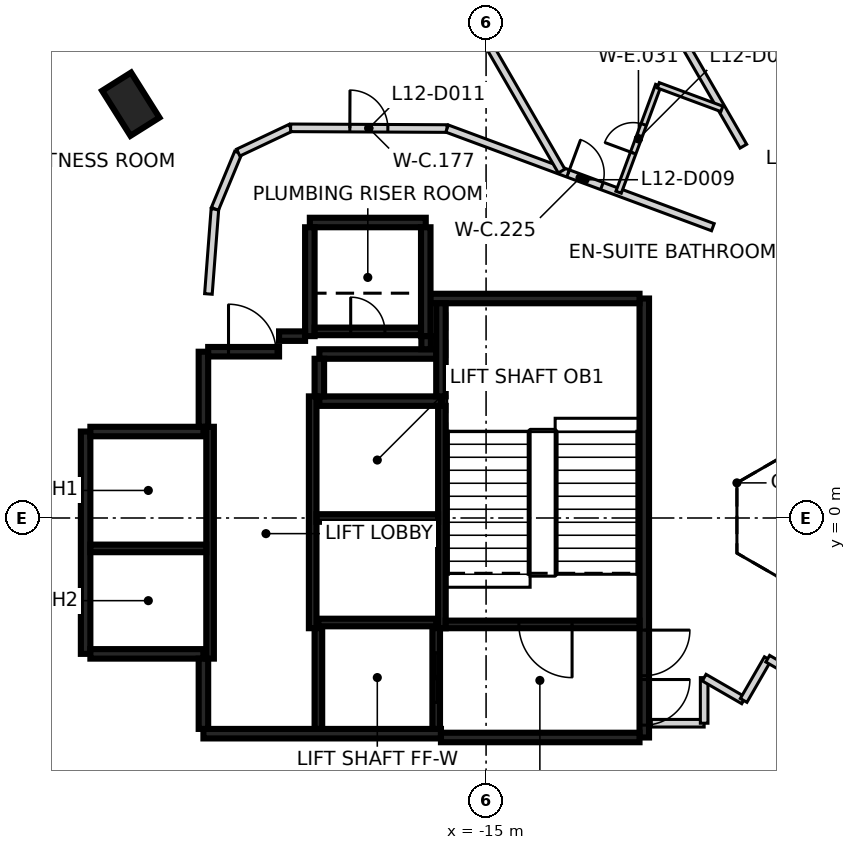
"""IFC4 building model, lengths in metres.
Left out: names, types, materials, properties, quantities, classifications, styles, units other than length and angle.
Written with IfcOpenShell. Run it as: python <this file> out.ifc"""

import sys

from ifc_helpers import new_model, si_unit, direction, frame, frame_2d, origin, origin_2d, place, context, subcontext, project, spatial, rectangle, extrude, element, fill, save


model = new_model("IFC4")
c1 = context("Model", 3, precision=1e-05, world=origin(), true_north=direction((0.0, 1.0)))
c2 = subcontext(c1, "Body", "Model", "MODEL_VIEW")
j1 = project(units=[si_unit("LENGTHUNIT", "METRE"), si_unit("PLANEANGLEUNIT", "RADIAN")], contexts=[c1])
p1 = place(None, origin())
s1 = spatial("IfcSite", under=j1, at=p1, CompositionType="ELEMENT")
p2 = place(p1, origin())
s2 = spatial("IfcBuilding", under=s1, at=p2, CompositionType="ELEMENT")
p3 = place(p2, frame((0.0, 0.0, 56.6)))
s3 = spatial("IfcBuildingStorey", under=s2, at=p3, CompositionType="ELEMENT", Elevation=56.6)
p4 = place(p3, frame((-24.349, 10.888, -0.475), z_axis=(0.0, 0.0, 1.0), x_axis=(-0.532388815436, 0.84649994046, 0.0)))
e1 = element("IfcColumn", 1, at=p4, inside=s3, PredefinedType="COLUMN", context=c2, shape_type="SweptSolid", body=[
    extrude(rectangle(XDim=1.4, YDim=0.9, at=origin_2d()), origin(), (0.0, 0.0, 1.0), 3.6),
])
p5 = place(p3, frame((-10.837, 5.775, 0.0), z_axis=(0.0, 0.0, 1.0), x_axis=(0.0, -1.0, 0.0)))
e2 = element("IfcWall", 2, at=p5, inside=s3, PredefinedType="SHEAR", context=c2, shape_type="SweptSolid", body=[
    extrude(rectangle(XDim=11.55, YDim=0.25, at=frame_2d((5.775, 0.0))), origin(), (0.0, 0.0, 1.0), 3.125),
])
p6 = place(p5, frame((10.025, 0.0, 0.0)))
e3 = element("IfcOpeningElement", 3, at=p6, cuts=e2, PredefinedType="OPENING", context=c2, shape_type="SweptSolid", body=[
    extrude(rectangle(XDim=1.2, YDim=2.1, at=frame_2d((0.6, 1.05))), frame((0.0, 0.135, 0.0), z_axis=(0.0, -1.0, 0.0), x_axis=(1.0, 0.0, 0.0)), (0.0, 0.0, 1.0), 0.27),
])
p7 = place(p5, frame((8.725, 0.0, 0.0)))
e4 = element("IfcOpeningElement", 4, at=p7, cuts=e2, PredefinedType="OPENING", context=c2, shape_type="SweptSolid", body=[
    extrude(rectangle(XDim=1.2, YDim=2.1, at=frame_2d((0.6, 1.05))), frame((0.0, 0.135, 0.0), z_axis=(0.0, -1.0, 0.0), x_axis=(1.0, 0.0, 0.0)), (0.0, 0.0, 1.0), 0.27),
])
p8 = place(p3, frame((-16.187, -5.675, 0.0), z_axis=(0.0, 0.0, 1.0), x_axis=(-1.0, 0.0, 0.0)))
e5 = element("IfcWall", 5, at=p8, inside=s3, PredefinedType="SHEAR", context=c2, shape_type="SweptSolid", body=[
    extrude(rectangle(XDim=6.25, YDim=0.25, at=frame_2d((3.125, 0.0))), origin(), (0.0, 0.0, 1.0), 3.125),
])
p9 = place(p3, frame((-25.537, -3.575, 0.0), z_axis=(0.0, 0.0, 1.0), x_axis=(0.0, 1.0, 0.0)))
e6 = element("IfcWall", 6, at=p9, inside=s3, PredefinedType="SHEAR", context=c2, shape_type="SweptSolid", body=[
    extrude(rectangle(XDim=5.85, YDim=0.25, at=frame_2d((2.925, 0.0))), origin(), (0.0, 0.0, 1.0), 3.125),
])
p10 = place(p3, frame((-10.963, -5.775, 0.0), z_axis=(0.0, 0.0, 1.0), x_axis=(-1.0, 0.0, 0.0)))
e7 = element("IfcWall", 7, at=p10, inside=s3, PredefinedType="SHEAR", context=c2, shape_type="SweptSolid", body=[
    extrude(rectangle(XDim=5.225, YDim=0.25, at=frame_2d((2.612, 0.0))), origin(), (0.0, 0.0, 1.0), 3.125),
])
p11 = place(p3, frame((-16.472, 5.775, 0.0), z_axis=(0.0, 0.0, 1.0), x_axis=(1.0, 0.0, 0.0)))
e8 = element("IfcWall", 8, at=p11, inside=s3, PredefinedType="SHEAR", context=c2, shape_type="SweptSolid", body=[
    extrude(rectangle(XDim=5.51, YDim=0.25, at=frame_2d((2.755, 0.0))), origin(), (0.0, 0.0, 1.0), 3.125),
])
p12 = place(p3, frame((-19.387, 3.075, 0.0), z_axis=(0.0, 0.0, 1.0), x_axis=(1.0, 0.0, 0.0)))
e9 = element("IfcWall", 9, at=p12, inside=s3, PredefinedType="SHEAR", context=c2, shape_type="SweptSolid", body=[
    extrude(rectangle(XDim=3.2, YDim=0.25, at=frame_2d((1.6, 0.0))), origin(), (0.0, 0.0, 1.0), 3.125),
])
for number, where, z_axis, x_axis in (
    (10, (-22.437, -3.575, 0.0), (0.0, 0.0, 1.0), (-1.0, 0.0, 0.0)),
    (11, (-25.412, 2.275, 0.0), (0.0, 0.0, 1.0), (1.0, 0.0, 0.0)),
):
    element("IfcWall", number, at=place(p3, frame(where, z_axis=z_axis, x_axis=x_axis)), inside=s3, PredefinedType="SHEAR", context=c2, shape_type="SweptSolid", body=[
        extrude(rectangle(XDim=2.975, YDim=0.25, at=frame_2d((1.487, 0.0))), origin(), (0.0, 0.0, 1.0), 3.125),
    ])
p13 = place(p3, frame((-19.637, 7.775, 0.0), z_axis=(0.0, 0.0, 1.0), x_axis=(1.0, 0.0, 0.0)))
e12 = element("IfcWall", 12, at=p13, inside=s3, PredefinedType="SHEAR", context=c2, shape_type="SweptSolid", body=[
    extrude(rectangle(XDim=3.05, YDim=0.25, at=frame_2d((1.525, 0.0))), origin(), (0.0, 0.0, 1.0), 3.125),
])
for number, where, z_axis, x_axis in (
    (13, (-16.587, 7.65, 0.0), (0.0, 0.0, 1.0), (0.0, -1.0, 0.0)),
    (14, (-19.637, 4.785, 0.0), (0.0, 0.0, 1.0), (0.0, 1.0, 0.0)),
):
    element("IfcWall", number, at=place(p3, frame(where, z_axis=z_axis, x_axis=x_axis)), inside=s3, PredefinedType="SHEAR", context=c2, shape_type="SweptSolid", body=[
        extrude(rectangle(XDim=2.865, YDim=0.25, at=frame_2d((1.432, 0.0))), origin(), (0.0, 0.0, 1.0), 3.125),
    ])
p14 = place(p3, frame((-16.302, 4.315, 0.0), z_axis=(0.0, 0.0, 1.0), x_axis=(-1.0, 0.0, 0.0)))
e15 = element("IfcWall", 15, at=p14, inside=s3, PredefinedType="SHEAR", context=c2, shape_type="SweptSolid", body=[
    extrude(rectangle(XDim=3.085, YDim=0.25, at=frame_2d((1.542, 0.0))), origin(), (0.0, 0.0, 1.0), 3.125),
])
p15 = place(p3, frame((-16.187, 3.2, 0.0), z_axis=(0.0, 0.0, 1.0), x_axis=(0.0, 1.0, 0.0)))
e16 = element("IfcWall", 16, at=p15, inside=s3, PredefinedType="SHEAR", context=c2, shape_type="SweptSolid", body=[
    extrude(rectangle(XDim=2.449, YDim=0.25, at=frame_2d((1.225, 0.0))), origin(), (0.0, 0.0, 1.0), 3.125),
])
p16 = place(p3, frame((-22.437, 2.4, 0.0), z_axis=(0.0, 0.0, 1.0), x_axis=(0.0, 1.0, 0.0)))
e17 = element("IfcWall", 17, at=p16, inside=s3, PredefinedType="SHEAR", context=c2, shape_type="SweptSolid", body=[
    extrude(rectangle(XDim=1.975, YDim=0.25, at=frame_2d((0.987, 0.0))), origin(), (0.0, 0.0, 1.0), 3.125),
])
p17 = place(p3, frame((-22.437, -5.55, 0.0), z_axis=(0.0, 0.0, 1.0), x_axis=(0.0, 1.0, 0.0)))
e18 = element("IfcWall", 18, at=p17, inside=s3, PredefinedType="SHEAR", context=c2, shape_type="SweptSolid", body=[
    extrude(rectangle(XDim=1.849, YDim=0.25, at=frame_2d((0.925, 0.0))), origin(), (0.0, 0.0, 1.0), 3.125),
])
p18 = place(p3, frame((-22.312, 4.375, 0.0), z_axis=(0.0, 0.0, 1.0), x_axis=(1.0, 0.0, 0.0)))
e19 = element("IfcWall", 19, at=p18, inside=s3, PredefinedType="SHEAR", context=c2, shape_type="SweptSolid", body=[
    extrude(rectangle(XDim=1.865, YDim=0.25, at=frame_2d((0.932, 0.0))), origin(), (0.0, 0.0, 1.0), 3.125),
])
p19 = place(p18, frame((0.535, 0.0, 0.0)))
e20 = element("IfcOpeningElement", 20, at=p19, cuts=e19, PredefinedType="OPENING", context=c2, shape_type="SweptSolid", body=[
    extrude(rectangle(XDim=1.25, YDim=2.1, at=frame_2d((0.625, 1.05))), frame((0.0, 0.135, 0.0), z_axis=(0.0, -1.0, 0.0), x_axis=(1.0, 0.0, 0.0)), (0.0, 0.0, 1.0), 0.27),
])
p20 = place(p3, frame((-19.387, 4.19, 0.0), z_axis=(0.0, 0.0, 1.0), x_axis=(0.0, -1.0, 0.0)))
e21 = element("IfcWall", 21, at=p20, inside=s3, PredefinedType="SHEAR", context=c2, shape_type="SweptSolid", body=[
    extrude(rectangle(XDim=0.989, YDim=0.25, at=frame_2d((0.495, 0.0))), origin(), (0.0, 0.0, 1.0), 3.125),
])
p21 = place(p3, frame((-20.447, 4.785, 0.0), z_axis=(0.0, 0.0, 1.0), x_axis=(1.0, 0.0, 0.0)))
e22 = element("IfcWall", 22, at=p21, inside=s3, PredefinedType="SHEAR", context=c2, shape_type="SweptSolid", body=[
    extrude(rectangle(XDim=0.685, YDim=0.25, at=frame_2d((0.342, 0.0))), origin(), (0.0, 0.0, 1.0), 3.125),
])
p22 = place(p3, frame((-16.577, 4.785, 0.0), z_axis=(0.0, 0.0, 1.0), x_axis=(0.0, -1.0, 0.0)))
e23 = element("IfcWall", 23, at=p22, inside=s3, PredefinedType="SHEAR", context=c2, shape_type="SweptSolid", body=[
    extrude(rectangle(XDim=0.344, YDim=0.25, at=frame_2d((0.172, 0.0))), origin(), (0.0, 0.0, 1.0), 3.125),
])
p23 = place(p3, frame((-16.162, 2.951, 0.0), z_axis=(0.0, 0.0, 1.0), x_axis=(0.0, -1.0, 0.0)))
e24 = element("IfcWall", 24, at=p23, inside=s3, PredefinedType="SHEAR", context=c2, shape_type="SweptSolid", body=[
    extrude(rectangle(XDim=5.851, YDim=0.2, at=frame_2d((2.925, 0.0))), origin(), (0.0, 0.0, 1.0), 3.125),
])
for number, where, z_axis, x_axis in (
    (25, (-19.562, -2.9, 0.0), (0.0, 0.0, 1.0), (0.0, 1.0, 0.0)),
    (26, (-22.262, 2.4, 0.0), (0.0, 0.0, 1.0), (0.0, -1.0, 0.0)),
):
    element("IfcWall", number, at=place(p3, frame(where, z_axis=z_axis, x_axis=x_axis)), inside=s3, PredefinedType="SHEAR", context=c2, shape_type="SweptSolid", body=[
        extrude(rectangle(XDim=6.1, YDim=0.2, at=frame_2d((3.05, 0.0))), origin(), (0.0, 0.0, 1.0), 3.125),
    ])
p24 = place(p3, frame((-10.963, -2.8, 0.0), z_axis=(0.0, 0.0, 1.0), x_axis=(-1.0, 0.0, 0.0)))
e27 = element("IfcWall", 27, at=p24, inside=s3, PredefinedType="SHEAR", context=c2, shape_type="SweptSolid", body=[
    extrude(rectangle(XDim=5.098, YDim=0.2, at=frame_2d((2.549, 0.0))), origin(), (0.0, 0.0, 1.0), 3.125),
])
p25 = place(p24, frame((1.774, 0.0, 0.0)))
e28 = element("IfcOpeningElement", 28, at=p25, cuts=e27, PredefinedType="OPENING", context=c2, shape_type="SweptSolid", body=[
    extrude(rectangle(XDim=1.4, YDim=2.1, at=frame_2d((0.7, 1.05))), frame((0.0, 0.11, 0.0), z_axis=(0.0, -1.0, 0.0), x_axis=(1.0, 0.0, 0.0)), (0.0, 0.0, 1.0), 0.22),
])
p26 = place(p3, frame((-16.263, 0.0, 0.0), z_axis=(0.0, 0.0, 1.0), x_axis=(-1.0, 0.0, 0.0)))
e29 = element("IfcWall", 29, at=p26, inside=s3, PredefinedType="SHEAR", context=c2, shape_type="SweptSolid", body=[
    extrude(rectangle(XDim=3.198, YDim=0.2, at=frame_2d((1.599, 0.0))), origin(), (0.0, 0.0, 1.0), 3.125),
])
p27 = place(p3, frame((-22.363, -0.8, 0.0), z_axis=(0.0, 0.0, 1.0), x_axis=(-1.0, 0.0, 0.0)))
e30 = element("IfcWall", 30, at=p27, inside=s3, PredefinedType="SHEAR", context=c2, shape_type="SweptSolid", body=[
    extrude(rectangle(XDim=3.048, YDim=0.2, at=frame_2d((1.524, 0.0))), origin(), (0.0, 0.0, 1.0), 3.125),
])
p28 = place(p3, frame((-19.511, 4.91, 0.0), z_axis=(0.0, 0.0, 1.0), x_axis=(1.0, 0.0, 0.0)))
e31 = element("IfcWall", 31, at=p28, inside=s3, PredefinedType="SHEAR", context=c2, shape_type="SweptSolid", body=[
    extrude(rectangle(XDim=2.798, YDim=0.2, at=frame_2d((1.399, 0.0))), origin(), (0.0, 0.0, 1.0), 3.125),
])
p29 = place(p28, frame((0.949, 0.0, 0.0)))
e32 = element("IfcOpeningElement", 32, at=p29, cuts=e31, PredefinedType="OPENING", context=c2, shape_type="SweptSolid", body=[
    extrude(rectangle(XDim=0.9, YDim=2.1, at=frame_2d((0.45, 1.05))), frame((0.0, 0.11, 0.0), z_axis=(0.0, -1.0, 0.0), x_axis=(1.0, 0.0, 0.0)), (0.0, 0.0, 1.0), 0.22),
])
p30 = place(p3, frame((-19.412, -2.75, 0.0), z_axis=(0.0, 0.0, 1.0), x_axis=(1.0, 0.0, 0.0)))
e33 = element("IfcWall", 33, at=p30, inside=s3, PredefinedType="SHEAR", context=c2, shape_type="SweptSolid", body=[
    extrude(rectangle(XDim=3.1, YDim=0.2, at=frame_2d((1.55, 0.0))), origin(), (0.0, 0.0, 1.0), 3.125),
])
p31 = place(p3, frame((-16.312, -2.898, 0.0), z_axis=(0.0, 0.0, 1.0), x_axis=(0.0, -1.0, 0.0)))
e34 = element("IfcWall", 34, at=p31, inside=s3, PredefinedType="SHEAR", context=c2, shape_type="SweptSolid", body=[
    extrude(rectangle(XDim=2.651, YDim=0.2, at=frame_2d((1.325, 0.0))), origin(), (0.0, 0.0, 1.0), 3.125),
])
p32 = place(p31, frame((0.652, 0.0, 0.0)))
e35 = element("IfcOpeningElement", 35, at=p32, cuts=e34, PredefinedType="OPENING", context=c2, shape_type="SweptSolid", body=[
    extrude(rectangle(XDim=1.3, YDim=2.1, at=frame_2d((0.65, 1.05))), frame((0.0, 0.11, 0.0), z_axis=(0.0, -1.0, 0.0), x_axis=(1.0, 0.0, 0.0)), (0.0, 0.0, 1.0), 0.22),
])
p33 = place(p3, frame((-19.412, -5.549, 0.0), z_axis=(0.0, 0.0, 1.0), x_axis=(0.0, 1.0, 0.0)))
e36 = element("IfcWall", 36, at=p33, inside=s3, PredefinedType="SHEAR", context=c2, shape_type="SweptSolid", body=[
    extrude(rectangle(XDim=2.651, YDim=0.2, at=frame_2d((1.325, 0.0))), origin(), (0.0, 0.0, 1.0), 3.125),
])
p34 = place(p3, frame((-22.306, 5.895, 0.0), z_axis=(0.0, 0.0, 1.0), x_axis=(0.076246699626, 0.997088983389, 0.0)))
e37 = element("IfcWall", 37, at=p34, inside=s3, PredefinedType="PARTITIONING", context=c2, shape_type="SweptSolid", body=[
    extrude(rectangle(XDim=2.241, YDim=0.2, at=frame_2d((1.121, 0.0))), origin(), (0.0, 0.0, 1.0), 3.125),
])
p35 = place(p3, frame((-22.135, 8.134, 0.0), z_axis=(0.0, 0.0, 1.0), x_axis=(0.383208453534, 0.923661886807, 0.0)))
e38 = element("IfcWall", 38, at=p35, inside=s3, PredefinedType="PARTITIONING", context=c2, shape_type="SweptSolid", body=[
    extrude(rectangle(XDim=1.602, YDim=0.2, at=frame_2d((0.801, 0.0))), origin(), (0.0, 0.0, 1.0), 3.125),
])
p36 = place(p3, frame((-21.521, 9.614, 0.0), z_axis=(0.0, 0.0, 1.0), x_axis=(0.904083527367, 0.427355795028, 0.0)))
e39 = element("IfcWall", 39, at=p36, inside=s3, PredefinedType="PARTITIONING", context=c2, shape_type="SweptSolid", body=[
    extrude(rectangle(XDim=1.523, YDim=0.2, at=frame_2d((0.761, 0.0))), origin(), (0.0, 0.0, 1.0), 3.125),
])
p37 = place(p3, frame((-20.143, 10.266, 0.0), z_axis=(0.0, 0.0, 1.0), x_axis=(0.999989297417, -0.004626559416, 0.0)))
e40 = element("IfcWall", 40, at=p37, inside=s3, PredefinedType="PARTITIONING", context=c2, shape_type="SweptSolid", body=[
    extrude(rectangle(XDim=4.116, YDim=0.2, at=frame_2d((2.058, 0.0))), origin(), (0.0, 0.0, 1.0), 3.125),
])
p38 = place(p37, frame((1.558, 0.0, 0.0)))
e41 = element("IfcOpeningElement", 41, at=p38, cuts=e40, PredefinedType="OPENING", context=c2, shape_type="SweptSolid", body=[
    extrude(rectangle(XDim=1.0, YDim=2.1, at=frame_2d((0.5, 1.05))), frame((0.0, 0.11, 0.0), z_axis=(0.0, -1.0, 0.0), x_axis=(1.0, 0.0, 0.0)), (0.0, 0.0, 1.0), 0.22),
])
p39 = place(p3, frame((-16.026, 10.247, 0.0), z_axis=(0.0, 0.0, 1.0), x_axis=(0.937540909117, -0.347875040397, 0.0)))
e42 = element("IfcWall", 42, at=p39, inside=s3, PredefinedType="PARTITIONING", context=c2, shape_type="SweptSolid", body=[
    extrude(rectangle(XDim=7.459, YDim=0.2, at=frame_2d((3.729, 0.0))), origin(), (0.0, 0.0, 1.0), 3.125),
])
p40 = place(p39, frame((3.396, 0.0, 0.0)))
e43 = element("IfcOpeningElement", 43, at=p40, cuts=e42, PredefinedType="OPENING", context=c2, shape_type="SweptSolid", body=[
    extrude(rectangle(XDim=0.95, YDim=2.1, at=frame_2d((0.475, 1.05))), frame((0.0, 0.11, 0.0), z_axis=(0.0, -1.0, 0.0), x_axis=(1.0, 0.0, 0.0)), (0.0, 0.0, 1.0), 0.22),
])
p41 = place(p3, frame((-10.652, -5.4, 0.0), z_axis=(0.0, 0.0, 1.0), x_axis=(1.0, 0.0, 0.0)))
e44 = element("IfcWall", 44, at=p41, inside=s3, PredefinedType="PARTITIONING", context=c2, shape_type="SweptSolid", body=[
    extrude(rectangle(XDim=1.39, YDim=0.2, at=frame_2d((0.695, 0.0))), origin(), (0.0, 0.0, 1.0), 3.125),
])
for number, where, z_axis, x_axis in (
    (45, (-9.262, -5.4, 0.0), (0.0, 0.0, 1.0), (0.0, 1.0, 0.0)),
    (46, (-9.262, -4.2, 0.0), (0.0, 0.0, 1.0), (0.866, -0.5, 0.0)),
):
    element("IfcWall", number, at=place(p3, frame(where, z_axis=z_axis, x_axis=x_axis)), inside=s3, PredefinedType="PARTITIONING", context=c2, shape_type="SweptSolid", body=[
        extrude(rectangle(XDim=1.2, YDim=0.2, at=frame_2d((0.6, 0.0))), origin(), (0.0, 0.0, 1.0), 3.125),
    ])
p42 = place(p3, frame((-8.223, -4.8, 0.0), z_axis=(0.0, 0.0, 1.0), x_axis=(0.499866914522, 0.866102227088, 0.0)))
e47 = element("IfcWall", 47, at=p42, inside=s3, PredefinedType="PARTITIONING", context=c2, shape_type="SweptSolid", body=[
    extrude(rectangle(XDim=1.268, YDim=0.2, at=frame_2d((0.634, 0.0))), origin(), (0.0, 0.0, 1.0), 3.125),
])
p43 = place(p3, frame((-7.589, -3.702, 0.0), z_axis=(0.0, 0.0, 1.0), x_axis=(0.865995139556, -0.500052415518, 0.0)))
e48 = element("IfcWall", 48, at=p43, inside=s3, PredefinedType="PARTITIONING", context=c2, shape_type="SweptSolid", body=[
    extrude(rectangle(XDim=8.689, YDim=0.2, at=frame_2d((4.344, 0.0))), origin(), (0.0, 0.0, 1.0), 3.125),
])
p44 = place(p43, frame((0.749, 0.0, 0.0)))
e49 = element("IfcOpeningElement", 49, at=p44, cuts=e48, PredefinedType="OPENING", context=c2, shape_type="SweptSolid", body=[
    extrude(rectangle(XDim=1.0, YDim=2.1, at=frame_2d((0.5, 1.05))), frame((0.0, 0.11, 0.0), z_axis=(0.0, -1.0, 0.0), x_axis=(1.0, 0.0, 0.0)), (0.0, 0.0, 1.0), 0.22),
])
p45 = place(p43, frame((5.819, 0.0, 0.0)))
e50 = element("IfcOpeningElement", 50, at=p45, cuts=e48, PredefinedType="OPENING", context=c2, shape_type="SweptSolid", body=[
    extrude(rectangle(XDim=0.95, YDim=2.1, at=frame_2d((0.475, 1.05))), frame((0.0, 0.11, 0.0), z_axis=(0.0, -1.0, 0.0), x_axis=(1.0, 0.0, 0.0)), (0.0, 0.0, 1.0), 0.22),
])
p46 = place(p3, frame((-17.996, 17.758, 0.0), z_axis=(0.0, 0.0, 1.0), x_axis=(0.500046945013, -0.865998298372, 0.0)))
e51 = element("IfcWall", 51, at=p46, inside=s3, PredefinedType="PARTITIONING", context=c2, shape_type="SweptSolid", body=[
    extrude(rectangle(XDim=9.964, YDim=0.2, at=frame_2d((4.982, 0.0))), origin(), (0.0, 0.0, 1.0), 3.125),
])
p47 = place(p3, frame((-14.149, 20.035, 0.0), z_axis=(0.0, 0.0, 1.0), x_axis=(0.500022967158, -0.866012143284, 0.0)))
e52 = element("IfcWall", 52, at=p47, inside=s3, PredefinedType="PARTITIONING", context=c2, shape_type="SweptSolid", body=[
    extrude(rectangle(XDim=11.838, YDim=0.2, at=frame_2d((5.919, 0.0))), origin(), (0.0, 0.0, 1.0), 3.125),
])
p48 = place(p3, frame((-14.148, -20.035, 0.0), z_axis=(0.0, 0.0, 1.0), x_axis=(0.500005855417, 0.866022023131, 0.0)))
e53 = element("IfcWall", 53, at=p48, inside=s3, PredefinedType="PARTITIONING", context=c2, shape_type="SweptSolid", body=[
    extrude(rectangle(XDim=17.425, YDim=0.2, at=frame_2d((8.712, 0.0))), origin(), (0.0, 0.0, 1.0), 3.125),
])
p49 = place(p3, frame((-10.276, 22.271, 0.0), z_axis=(0.0, 0.0, 1.0), x_axis=(0.499975954304, -0.866039286129, 0.0)))
e54 = element("IfcWall", 54, at=p49, inside=s3, PredefinedType="PARTITIONING", context=c2, shape_type="SweptSolid", body=[
    extrude(rectangle(XDim=17.424, YDim=0.2, at=frame_2d((8.712, 0.0))), origin(), (0.0, 0.0, 1.0), 3.125),
])
p50 = place(p3, frame((-11.513, 8.572, 0.0), z_axis=(0.0, 0.0, 1.0), x_axis=(0.347929104424, 0.937520846859, 0.0)))
e55 = element("IfcWall", 55, at=p50, inside=s3, PredefinedType="PARTITIONING", context=c2, shape_type="SweptSolid", body=[
    extrude(rectangle(XDim=3.0, YDim=0.15, at=frame_2d((1.5, 0.0))), origin(), (0.0, 0.0, 1.0), 3.125),
])
p51 = place(p50, frame((1.1, 0.0, 0.0)))
e56 = element("IfcOpeningElement", 56, at=p51, cuts=e55, PredefinedType="OPENING", context=c2, shape_type="SweptSolid", body=[
    extrude(rectangle(XDim=0.8, YDim=2.1, at=frame_2d((0.4, 1.05))), frame((0.0, 0.085, 0.0), z_axis=(0.0, -1.0, 0.0), x_axis=(1.0, 0.0, 0.0)), (0.0, 0.0, 1.0), 0.17),
])
p52 = place(p3, frame((-10.469, 11.385, 0.0), z_axis=(0.0, 0.0, 1.0), x_axis=(0.937487768635, -0.348018223173, 0.0)))
e57 = element("IfcWall", 57, at=p52, inside=s3, PredefinedType="PARTITIONING", context=c2, shape_type="SweptSolid", body=[
    extrude(rectangle(XDim=1.785, YDim=0.15, at=frame_2d((0.892, 0.0))), origin(), (0.0, 0.0, 1.0), 3.125),
])
p53 = place(p32, origin())
e58 = element("IfcDoor", 58, at=p53, inside=s3, OperationType="SLIDING_TO_RIGHT", PredefinedType="DOOR", context=c2, shape_type="SweptSolid", body=[
    extrude(rectangle(XDim=1.3, YDim=2.1, at=frame_2d((0.65, 1.05))), frame((0.0, 0.025, 0.0), z_axis=(0.0, -1.0, 0.0), x_axis=(1.0, 0.0, 0.0)), (0.0, 0.0, 1.0), 0.05),
])
fill(e35, e58)
p54 = place(p19, origin())
e59 = element("IfcDoor", 59, at=p54, inside=s3, OperationType="SINGLE_SWING_LEFT", PredefinedType="DOOR", context=c2, shape_type="SweptSolid", body=[
    extrude(rectangle(XDim=1.25, YDim=2.1, at=frame_2d((0.625, 1.05))), frame((0.0, 0.025, 0.0), z_axis=(0.0, -1.0, 0.0), x_axis=(1.0, 0.0, 0.0)), (0.0, 0.0, 1.0), 0.05),
])
fill(e20, e59)
p55 = place(p6, origin())
e60 = element("IfcDoor", 60, at=p55, inside=s3, OperationType="SINGLE_SWING_LEFT", PredefinedType="DOOR", context=c2, shape_type="SweptSolid", body=[
    extrude(rectangle(XDim=1.2, YDim=2.1, at=frame_2d((0.6, 1.05))), frame((0.0, 0.025, 0.0), z_axis=(0.0, -1.0, 0.0), x_axis=(1.0, 0.0, 0.0)), (0.0, 0.0, 1.0), 0.05),
])
fill(e3, e60)
p56 = place(p7, origin())
e61 = element("IfcDoor", 61, at=p56, inside=s3, OperationType="SINGLE_SWING_RIGHT", PredefinedType="DOOR", context=c2, shape_type="SweptSolid", body=[
    extrude(rectangle(XDim=1.2, YDim=2.1, at=frame_2d((0.6, 1.05))), frame((0.0, 0.025, 0.0), z_axis=(0.0, -1.0, 0.0), x_axis=(1.0, 0.0, 0.0)), (0.0, 0.0, 1.0), 0.05),
])
fill(e4, e61)
p57 = place(p25, origin())
e62 = element("IfcDoor", 62, at=p57, inside=s3, OperationType="SINGLE_SWING_RIGHT", PredefinedType="DOOR", context=c2, shape_type="SweptSolid", body=[
    extrude(rectangle(XDim=1.4, YDim=2.1, at=frame_2d((0.7, 1.05))), frame((0.0, 0.025, 0.0), z_axis=(0.0, -1.0, 0.0), x_axis=(1.0, 0.0, 0.0)), (0.0, 0.0, 1.0), 0.05),
])
fill(e28, e62)
p58 = place(p29, origin())
e63 = element("IfcDoor", 63, at=p58, inside=s3, OperationType="SINGLE_SWING_LEFT", PredefinedType="DOOR", context=c2, shape_type="SweptSolid", body=[
    extrude(rectangle(XDim=0.9, YDim=2.1, at=frame_2d((0.45, 1.05))), frame((0.0, 0.025, 0.0), z_axis=(0.0, -1.0, 0.0), x_axis=(1.0, 0.0, 0.0)), (0.0, 0.0, 1.0), 0.05),
])
fill(e32, e63)
p59 = place(p40, origin())
e64 = element("IfcDoor", 64, at=p59, inside=s3, OperationType="SINGLE_SWING_LEFT", PredefinedType="DOOR", context=c2, shape_type="SweptSolid", body=[
    extrude(rectangle(XDim=0.95, YDim=2.1, at=frame_2d((0.475, 1.05))), frame((0.0, 0.025, 0.0), z_axis=(0.0, -1.0, 0.0), x_axis=(1.0, 0.0, 0.0)), (0.0, 0.0, 1.0), 0.05),
])
fill(e43, e64)
p60 = place(p51, origin())
e65 = element("IfcDoor", 65, at=p60, inside=s3, OperationType="SINGLE_SWING_LEFT", PredefinedType="DOOR", context=c2, shape_type="SweptSolid", body=[
    extrude(rectangle(XDim=0.8, YDim=2.1, at=frame_2d((0.4, 1.05))), frame((0.0, 0.025, 0.0), z_axis=(0.0, -1.0, 0.0), x_axis=(1.0, 0.0, 0.0)), (0.0, 0.0, 1.0), 0.05),
])
fill(e56, e65)
p61 = place(p38, origin())
e66 = element("IfcDoor", 66, at=p61, inside=s3, OperationType="SINGLE_SWING_LEFT", PredefinedType="DOOR", context=c2, shape_type="SweptSolid", body=[
    extrude(rectangle(XDim=1.0, YDim=2.1, at=frame_2d((0.5, 1.05))), frame((0.0, 0.025, 0.0), z_axis=(0.0, -1.0, 0.0), x_axis=(1.0, 0.0, 0.0)), (0.0, 0.0, 1.0), 0.05),
])
fill(e41, e66)
save(model, sys.argv[1])
